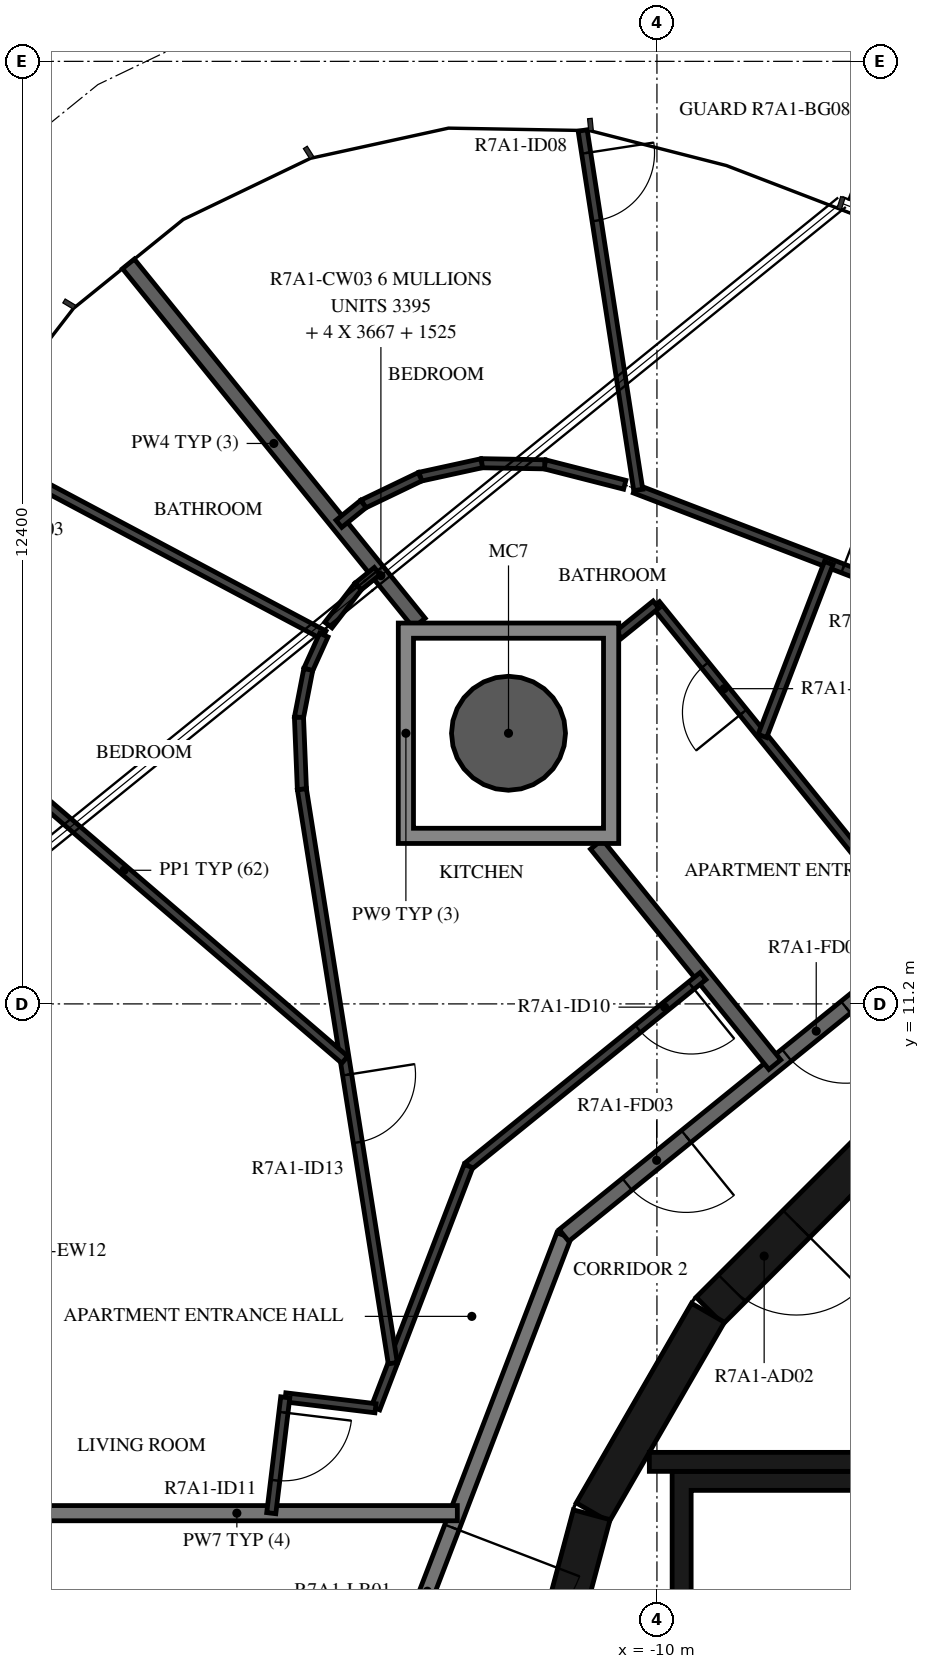
"""IFC4 building model, lengths in metres.
Left out: names, types, materials, properties, quantities, classifications, styles, units other than length and angle.
Written with IfcOpenShell. Run it as: python <this file> out.ifc"""

import sys

from ifc_helpers import new_model, si_unit, direction, frame, frame_2d, origin, origin_2d, place, context, subcontext, project, spatial, polyline, rectangle, hollow_circle, outline, extrude, element, fill, save


model = new_model("IFC4")
c1 = context("Model", 3, precision=1e-05, world=origin(), true_north=direction((0.0, 1.0)))
c2 = subcontext(c1, "Body", "Model", "MODEL_VIEW")
j1 = project(units=[si_unit("LENGTHUNIT", "METRE"), si_unit("PLANEANGLEUNIT", "RADIAN")], contexts=[c1])
p1 = place(None, origin())
s1 = spatial("IfcSite", under=j1, at=p1, CompositionType="ELEMENT")
p2 = place(p1, origin())
s2 = spatial("IfcBuilding", under=s1, at=p2, CompositionType="ELEMENT")
p3 = place(p2, frame((0.0, 0.0, 266.9)))
s3 = spatial("IfcBuildingStorey", under=s2, at=p3, CompositionType="ELEMENT", Elevation=266.9)
p4 = place(p3, frame((-11.953, 14.76, -0.38), z_axis=(0.0, 0.0, 1.0), x_axis=(1.0, 0.0, 0.0)))
e1 = element("IfcColumn", 1, at=p4, inside=s3, PredefinedType="COLUMN", context=c2, shape_type="SweptSolid", body=[
    extrude(hollow_circle(Radius=0.75, WallThickness=0.035, at=origin_2d()), origin(), (0.0, 0.0, 1.0), 3.5),
])
p5 = place(p3, frame((-7.164, 9.308, 0.0), z_axis=(0.0, 0.0, 1.0), x_axis=(-0.707106781187, -0.707106781187, 0.0)))
e2 = element("IfcWall", 2, at=p5, inside=s3, PredefinedType="SHEAR", context=c2, shape_type="SweptSolid", body=[
    extrude(rectangle(XDim=3.032, YDim=0.5, at=frame_2d((1.516, 0.0))), origin(), (0.0, 0.0, 1.0), 3.12),
])
p6 = place(p5, frame((1.416, 0.0, 0.0)))
e3 = element("IfcOpeningElement", 3, at=p6, cuts=e2, PredefinedType="OPENING", context=c2, shape_type="SweptSolid", body=[
    extrude(rectangle(XDim=1.2, YDim=2.1, at=frame_2d((0.6, 1.05))), frame((0.0, 0.26, 0.0), z_axis=(0.0, -1.0, 0.0), x_axis=(1.0, 0.0, 0.0)), (0.0, 0.0, 1.0), 0.52),
])
for number, where, z_axis, x_axis in (
    (4, (-9.329, 7.137, 0.0), (0.0, 0.0, 1.0), (-0.5, -0.866, 0.0)),
    (5, (-10.858, 4.479, 0.0), (0.0, 0.0, 1.0), (-0.259, -0.966, 0.0)),
):
    element("IfcWall", number, at=place(p3, frame(where, z_axis=z_axis, x_axis=x_axis)), inside=s3, PredefinedType="SHEAR", context=c2, shape_type="SweptSolid", body=[
        extrude(rectangle(XDim=3.033, YDim=0.5, at=frame_2d((1.516, 0.0))), origin(), (0.0, 0.0, 1.0), 3.12),
    ])
p7 = place(p3, frame((-7.0, 5.175, 0.0), z_axis=(0.0, 0.0, 1.0), x_axis=(-1.0, 0.0, 0.0)))
e6 = element("IfcWall", 6, at=p7, inside=s3, PredefinedType="SHEAR", context=c2, shape_type="SweptSolid", body=[
    extrude(rectangle(XDim=3.1, YDim=0.25, at=frame_2d((1.55, 0.0))), origin(), (0.0, 0.0, 1.0), 3.12),
])
p8 = place(p3, origin())
e7 = element("IfcWall", 7, at=p8, inside=s3, PredefinedType="SHEAR", context=c2, shape_type="SweptSolid", body=[
    extrude(outline(polyline([(-9.8, 1.9), (-9.55, 1.9), (-9.55, 4.8), (3.1, 4.8), (3.1, 1.9), (3.35, 1.9), (3.35, 4.8), (5.25, 4.8), (5.25, 1.9), (5.5, 1.9), (5.5, 4.8), (7.4, 4.8), (7.4, 1.9), (7.65, 1.9), (7.65, 4.8), (9.55, 4.8), (9.55, 1.9), (9.8, 1.9), (9.8, 4.8), (9.8, 5.05), (-9.8, 5.05), (-9.8, 4.8), (-9.8, 1.9)])), origin(), (0.0, 0.0, 1.0), 3.12),
])
p9 = place(p3, frame((-11.223, 8.154, 0.0), z_axis=(0.0, 0.0, 1.0), x_axis=(-0.358341090983, -0.93359073609, 0.0)))
e8 = element("IfcWall", 8, at=p9, inside=s3, PredefinedType="STANDARD", context=c2, shape_type="SweptSolid", body=[
    extrude(rectangle(XDim=7.181, YDim=0.2, at=frame_2d((3.59, 0.0))), origin(), (0.0, 0.0, 1.0), 3.12),
])
p10 = place(p9, frame((4.114, 0.0, 0.0)))
e9 = element("IfcOpeningElement", 9, at=p10, cuts=e8, PredefinedType="OPENING", context=c2, shape_type="SweptSolid", body=[
    extrude(rectangle(XDim=1.8, YDim=2.1, at=frame_2d((0.9, 1.05))), frame((0.0, 0.11, 0.0), z_axis=(0.0, -1.0, 0.0), x_axis=(1.0, 0.0, 0.0)), (0.0, 0.0, 1.0), 0.22),
])
p11 = place(p3, frame((-5.643, 12.673, 0.0), z_axis=(0.0, 0.0, 1.0), x_axis=(-0.777160148113, -0.629302871585, 0.0)))
e10 = element("IfcWall", 10, at=p11, inside=s3, PredefinedType="STANDARD", context=c2, shape_type="SweptSolid", body=[
    extrude(rectangle(XDim=7.181, YDim=0.2, at=frame_2d((3.59, 0.0))), origin(), (0.0, 0.0, 1.0), 3.12),
])
p12 = place(p11, frame((2.41, 0.0, 0.0)))
e11 = element("IfcOpeningElement", 11, at=p12, cuts=e10, PredefinedType="OPENING", context=c2, shape_type="SweptSolid", body=[
    extrude(rectangle(XDim=1.0, YDim=2.1, at=frame_2d((0.5, 1.05))), frame((0.0, 0.11, 0.0), z_axis=(0.0, -1.0, 0.0), x_axis=(1.0, 0.0, 0.0)), (0.0, 0.0, 1.0), 0.22),
])
p13 = place(p11, frame((5.112, 0.0, 0.0)))
e12 = element("IfcOpeningElement", 12, at=p13, cuts=e10, PredefinedType="OPENING", context=c2, shape_type="SweptSolid", body=[
    extrude(rectangle(XDim=1.0, YDim=2.1, at=frame_2d((0.5, 1.05))), frame((0.0, 0.11, 0.0), z_axis=(0.0, -1.0, 0.0), x_axis=(1.0, 0.0, 0.0)), (0.0, 0.0, 1.0), 0.22),
])
p14 = place(p3, frame((-12.626, 4.5, 0.0), z_axis=(0.0, 0.0, 1.0), x_axis=(-1.0, 0.0, 0.0)))
e13 = element("IfcWall", 13, at=p14, inside=s3, PredefinedType="STANDARD", context=c2, shape_type="SweptSolid", body=[
    extrude(rectangle(XDim=5.802, YDim=0.2, at=frame_2d((2.901, 0.0))), origin(), (0.0, 0.0, 1.0), 3.12),
])
p15 = place(p3, frame((-10.796, 13.299, 0.0), z_axis=(0.0, 0.0, 1.0), x_axis=(0.629290499381, -0.777170166301, 0.0)))
e14 = element("IfcWall", 14, at=p15, inside=s3, PredefinedType="STANDARD", context=c2, shape_type="SweptSolid", body=[
    extrude(rectangle(XDim=3.729, YDim=0.2, at=frame_2d((1.865, 0.0))), origin(), (0.0, 0.0, 1.0), 3.12),
])
p16 = place(p3, frame((-16.953, 20.936, 0.0), z_axis=(0.0, 0.0, 1.0), x_axis=(0.629331057166, -0.777137324085, 0.0)))
e15 = element("IfcWall", 15, at=p16, inside=s3, PredefinedType="STANDARD", context=c2, shape_type="SweptSolid", body=[
    extrude(rectangle(XDim=6.08, YDim=0.2, at=frame_2d((3.04, 0.0))), origin(), (0.0, 0.0, 1.0), 3.12),
])
p17 = place(p3, frame((-7.377, 13.199, 0.0), z_axis=(0.0, 0.0, 1.0), x_axis=(-0.629382670352, 0.77709552454, 0.0)))
e16 = element("IfcWall", 16, at=p17, inside=s3, PredefinedType="PARTITIONING", context=c2, shape_type="SweptSolid", body=[
    extrude(rectangle(XDim=4.188, YDim=0.12, at=frame_2d((2.094, 0.0))), origin(), (0.0, 0.0, 1.0), 3.12),
])
p18 = place(p17, frame((2.364, 0.0, 0.0)))
e17 = element("IfcOpeningElement", 17, at=p18, cuts=e16, PredefinedType="OPENING", context=c2, shape_type="SweptSolid", body=[
    extrude(rectangle(XDim=0.8, YDim=2.1, at=frame_2d((0.4, 1.05))), frame((0.0, 0.07, 0.0), z_axis=(0.0, -1.0, 0.0), x_axis=(1.0, 0.0, 0.0)), (0.0, 0.0, 1.0), 0.14),
])
p19 = place(p3, frame((-10.013, 16.454, 0.0), z_axis=(0.0, 0.0, 1.0), x_axis=(-0.777001388062, -0.629498882406, 0.0)))
e18 = element("IfcWall", 18, at=p19, inside=s3, PredefinedType="PARTITIONING", context=c2, shape_type="SweptSolid", body=[
    extrude(rectangle(XDim=0.631, YDim=0.12, at=frame_2d((0.315, 0.0))), origin(), (0.0, 0.0, 1.0), 3.12),
])
p20 = place(p3, frame((-10.289, 17.978, 0.0), z_axis=(0.0, 0.0, 1.0), x_axis=(0.933579293595, -0.358370900844, 0.0)))
e19 = element("IfcWall", 19, at=p20, inside=s3, PredefinedType="PARTITIONING", context=c2, shape_type="SweptSolid", body=[
    extrude(rectangle(XDim=8.932, YDim=0.12, at=frame_2d((4.466, 0.0))), origin(), (0.0, 0.0, 1.0), 3.12),
])
p21 = place(p20, frame((2.93, 0.0, 0.0)))
e20 = element("IfcOpeningElement", 20, at=p21, cuts=e19, PredefinedType="OPENING", context=c2, shape_type="SweptSolid", body=[
    extrude(rectangle(XDim=0.9, YDim=2.1, at=frame_2d((0.45, 1.05))), frame((0.0, 0.07, 0.0), z_axis=(0.0, -1.0, 0.0), x_axis=(1.0, 0.0, 0.0)), (0.0, 0.0, 1.0), 0.14),
])
p22 = place(p3, frame((-10.977, 22.691, 0.0), z_axis=(0.0, 0.0, 1.0), x_axis=(0.152888983102, -0.988243370252, 0.0)))
e21 = element("IfcWall", 21, at=p22, inside=s3, PredefinedType="PARTITIONING", context=c2, shape_type="SweptSolid", body=[
    extrude(rectangle(XDim=4.786, YDim=0.12, at=frame_2d((2.393, 0.0))), origin(), (0.0, 0.0, 1.0), 3.12),
])
p23 = place(p22, frame((0.3, 0.0, 0.0)))
e22 = element("IfcOpeningElement", 22, at=p23, cuts=e21, PredefinedType="OPENING", context=c2, shape_type="SweptSolid", body=[
    extrude(rectangle(XDim=0.9, YDim=2.1, at=frame_2d((0.45, 1.05))), frame((0.0, 0.07, 0.0), z_axis=(0.0, -1.0, 0.0), x_axis=(1.0, 0.0, 0.0)), (0.0, 0.0, 1.0), 0.14),
])
p24 = place(p3, frame((-7.74, 17.0, 0.0), z_axis=(0.0, 0.0, 1.0), x_axis=(-0.358394723652, -0.93357014844, 0.0)))
e23 = element("IfcWall", 23, at=p24, inside=s3, PredefinedType="PARTITIONING", context=c2, shape_type="SweptSolid", body=[
    extrude(rectangle(XDim=2.436, YDim=0.12, at=frame_2d((1.218, 0.0))), origin(), (0.0, 0.0, 1.0), 3.12),
])
p25 = place(p3, frame((-10.424, 18.03, 0.0), z_axis=(0.0, 0.0, 1.0), x_axis=(-0.968874161395, 0.247553750489, 0.0)))
e24 = element("IfcWall", 24, at=p25, inside=s3, PredefinedType="PARTITIONING", context=c2, shape_type="SweptSolid", body=[
    extrude(rectangle(XDim=1.087, YDim=0.12, at=frame_2d((0.543, 0.0))), origin(), (0.0, 0.0, 1.0), 3.12),
])
p26 = place(p3, frame((-11.477, 18.299, 0.0), z_axis=(0.0, 0.0, 1.0), x_axis=(-0.999848939146, 0.017380992165, 0.0)))
e25 = element("IfcWall", 25, at=p26, inside=s3, PredefinedType="PARTITIONING", context=c2, shape_type="SweptSolid", body=[
    extrude(rectangle(XDim=0.829, YDim=0.12, at=frame_2d((0.415, 0.0))), origin(), (0.0, 0.0, 1.0), 3.12),
])
p27 = place(p3, frame((-12.305, 18.313, 0.0), z_axis=(0.0, 0.0, 1.0), x_axis=(-0.976949932909, -0.21346856581, 0.0)))
e26 = element("IfcWall", 26, at=p27, inside=s3, PredefinedType="PARTITIONING", context=c2, shape_type="SweptSolid", body=[
    extrude(rectangle(XDim=0.829, YDim=0.12, at=frame_2d((0.415, 0.0))), origin(), (0.0, 0.0, 1.0), 3.12),
])
p28 = place(p3, frame((-13.115, 18.136, 0.0), z_axis=(0.0, 0.0, 1.0), x_axis=(-0.901385111422, -0.43301833784, 0.0)))
e27 = element("IfcWall", 27, at=p28, inside=s3, PredefinedType="PARTITIONING", context=c2, shape_type="SweptSolid", body=[
    extrude(rectangle(XDim=0.829, YDim=0.12, at=frame_2d((0.415, 0.0))), origin(), (0.0, 0.0, 1.0), 3.12),
])
p29 = place(p3, frame((-13.862, 17.777, 0.0), z_axis=(0.0, 0.0, 1.0), x_axis=(-0.776888119785, -0.629638665694, 0.0)))
e28 = element("IfcWall", 28, at=p29, inside=s3, PredefinedType="PARTITIONING", context=c2, shape_type="SweptSolid", body=[
    extrude(rectangle(XDim=0.415, YDim=0.12, at=frame_2d((0.207, 0.0))), origin(), (0.0, 0.0, 1.0), 3.12),
])
p30 = place(p3, frame((-9.393, 11.566, 0.0), z_axis=(0.0, 0.0, 1.0), x_axis=(-0.777100258587, -0.629376825205, 0.0)))
e29 = element("IfcWall", 29, at=p30, inside=s3, PredefinedType="PARTITIONING", context=c2, shape_type="SweptSolid", body=[
    extrude(rectangle(XDim=3.971, YDim=0.12, at=frame_2d((1.986, 0.0))), origin(), (0.0, 0.0, 1.0), 3.12),
])
p31 = place(p30, frame((0.2, 0.0, 0.0)))
e30 = element("IfcOpeningElement", 30, at=p31, cuts=e29, PredefinedType="OPENING", context=c2, shape_type="SweptSolid", body=[
    extrude(rectangle(XDim=0.9, YDim=2.1, at=frame_2d((0.45, 1.05))), frame((0.0, 0.07, 0.0), z_axis=(0.0, -1.0, 0.0), x_axis=(1.0, 0.0, 0.0)), (0.0, 0.0, 1.0), 0.14),
])
p32 = place(p3, frame((-12.479, 9.067, 0.0), z_axis=(0.0, 0.0, 1.0), x_axis=(-0.358394302064, -0.933570310286, 0.0)))
e31 = element("IfcWall", 31, at=p32, inside=s3, PredefinedType="PARTITIONING", context=c2, shape_type="SweptSolid", body=[
    extrude(rectangle(XDim=3.414, YDim=0.12, at=frame_2d((1.707, 0.0))), origin(), (0.0, 0.0, 1.0), 3.12),
])
p33 = place(p3, frame((-13.703, 5.88, 0.0), z_axis=(0.0, 0.0, 1.0), x_axis=(-0.992763323859, 0.120087396509, 0.0)))
e32 = element("IfcWall", 32, at=p33, inside=s3, PredefinedType="PARTITIONING", context=c2, shape_type="SweptSolid", body=[
    extrude(rectangle(XDim=1.195, YDim=0.12, at=frame_2d((0.598, 0.0))), origin(), (0.0, 0.0, 1.0), 3.12),
])
p34 = place(p3, frame((-14.89, 6.024, 0.0), z_axis=(0.0, 0.0, 1.0), x_axis=(-0.120255360044, -0.992742992109, 0.0)))
e33 = element("IfcWall", 33, at=p34, inside=s3, PredefinedType="PARTITIONING", context=c2, shape_type="SweptSolid", body=[
    extrude(rectangle(XDim=1.535, YDim=0.12, at=frame_2d((0.768, 0.0))), origin(), (0.0, 0.0, 1.0), 3.12),
])
p35 = place(p34, frame((0.2, 0.0, 0.0)))
e34 = element("IfcOpeningElement", 34, at=p35, cuts=e33, PredefinedType="OPENING", context=c2, shape_type="SweptSolid", body=[
    extrude(rectangle(XDim=0.9, YDim=2.1, at=frame_2d((0.45, 1.05))), frame((0.0, 0.07, 0.0), z_axis=(0.0, -1.0, 0.0), x_axis=(1.0, 0.0, 0.0)), (0.0, 0.0, 1.0), 0.14),
])
p36 = place(p3, frame((-14.323, 16.184, 0.0), z_axis=(0.0, 0.0, 1.0), x_axis=(0.611198506308, 0.791477343887, 0.0)))
e35 = element("IfcWall", 35, at=p36, inside=s3, PredefinedType="PARTITIONING", context=c2, shape_type="SweptSolid", body=[
    extrude(rectangle(XDim=0.642, YDim=0.12, at=frame_2d((0.321, 0.0))), origin(), (0.0, 0.0, 1.0), 3.12),
])
p37 = place(p3, frame((-13.93, 16.692, 0.0), z_axis=(0.0, 0.0, 1.0), x_axis=(0.776695397137, 0.62987638475, 0.0)))
e36 = element("IfcWall", 36, at=p37, inside=s3, PredefinedType="PARTITIONING", context=c2, shape_type="SweptSolid", body=[
    extrude(rectangle(XDim=0.321, YDim=0.12, at=frame_2d((0.161, 0.0))), origin(), (0.0, 0.0, 1.0), 3.12),
])
p38 = place(p3, frame((-18.983, 18.499, 0.0), z_axis=(0.0, 0.0, 1.0), x_axis=(0.882948840489, -0.469469216328, 0.0)))
e37 = element("IfcWall", 37, at=p38, inside=s3, PredefinedType="PARTITIONING", context=c2, shape_type="SweptSolid", body=[
    extrude(rectangle(XDim=5.211, YDim=0.12, at=frame_2d((2.605, 0.0))), origin(), (0.0, 0.0, 1.0), 2.73),
])
p39 = place(p38, frame((0.2, 0.0, 0.0)))
e38 = element("IfcOpeningElement", 38, at=p39, cuts=e37, PredefinedType="OPENING", context=c2, shape_type="SweptSolid", body=[
    extrude(rectangle(XDim=0.8, YDim=2.1, at=frame_2d((0.4, 1.05))), frame((0.0, 0.07, 0.0), z_axis=(0.0, -1.0, 0.0), x_axis=(1.0, 0.0, 0.0)), (0.0, 0.0, 1.0), 0.14),
])
p40 = place(p3, frame((-14.382, 16.052, 0.0), z_axis=(0.0, 0.0, 1.0), x_axis=(-0.412099912529, -0.911138662385, 0.0)))
e39 = element("IfcWall", 39, at=p40, inside=s3, PredefinedType="PARTITIONING", context=c2, shape_type="SweptSolid", body=[
    extrude(rectangle(XDim=0.497, YDim=0.12, at=frame_2d((0.249, 0.0))), origin(), (0.0, 0.0, 1.0), 3.12),
])
p41 = place(p3, frame((-14.587, 15.6, 0.0), z_axis=(0.0, 0.0, 1.0), x_axis=(-0.190920556667, -0.98160549155, 0.0)))
e40 = element("IfcWall", 40, at=p41, inside=s3, PredefinedType="PARTITIONING", context=c2, shape_type="SweptSolid", body=[
    extrude(rectangle(XDim=0.642, YDim=0.12, at=frame_2d((0.321, 0.0))), origin(), (0.0, 0.0, 1.0), 3.12),
])
p42 = place(p3, frame((-14.709, 14.969, 0.0), z_axis=(0.0, 0.0, 1.0), x_axis=(0.040729848009, -0.999170195453, 0.0)))
e41 = element("IfcWall", 41, at=p42, inside=s3, PredefinedType="PARTITIONING", context=c2, shape_type="SweptSolid", body=[
    extrude(rectangle(XDim=0.947, YDim=0.12, at=frame_2d((0.474, 0.0))), origin(), (0.0, 0.0, 1.0), 3.12),
])
p43 = place(p3, frame((-14.671, 14.023, 0.0), z_axis=(0.0, 0.0, 1.0), x_axis=(0.156438190471, -0.987687750538, 0.0)))
e42 = element("IfcWall", 42, at=p43, inside=s3, PredefinedType="PARTITIONING", context=c2, shape_type="SweptSolid", body=[
    extrude(rectangle(XDim=7.644, YDim=0.12, at=frame_2d((3.822, 0.0))), origin(), (0.0, 0.0, 1.0), 3.12),
])
p44 = place(p43, frame((3.803, 0.0, 0.0)))
e43 = element("IfcOpeningElement", 43, at=p44, cuts=e42, PredefinedType="OPENING", context=c2, shape_type="SweptSolid", body=[
    extrude(rectangle(XDim=0.9, YDim=2.1, at=frame_2d((0.45, 1.05))), frame((0.0, 0.07, 0.0), z_axis=(0.0, -1.0, 0.0), x_axis=(1.0, 0.0, 0.0)), (0.0, 0.0, 1.0), 0.14),
])
p45 = place(p3, frame((-19.913, 15.451, 0.0), z_axis=(0.0, 0.0, 1.0), x_axis=(0.758623462992, -0.6515293097, 0.0)))
e44 = element("IfcWall", 44, at=p45, inside=s3, PredefinedType="PARTITIONING", context=c2, shape_type="SweptSolid", body=[
    extrude(rectangle(XDim=7.653, YDim=0.12, at=frame_2d((3.826, 0.0))), origin(), (0.0, 0.0, 1.0), 3.12),
])
p46 = place(p45, frame((0.7, 0.0, 0.0)))
e45 = element("IfcOpeningElement", 45, at=p46, cuts=e44, PredefinedType="OPENING", context=c2, shape_type="SweptSolid", body=[
    extrude(rectangle(XDim=0.9, YDim=2.1, at=frame_2d((0.45, 1.05))), frame((0.0, 0.07, 0.0), z_axis=(0.0, -1.0, 0.0), x_axis=(1.0, 0.0, 0.0)), (0.0, 0.0, 1.0), 0.14),
])
p47 = place(p3, origin())
e46 = element("IfcWall", 46, at=p47, inside=s3, PredefinedType="STANDARD", context=c2, shape_type="SweptSolid", body=[
    extrude(outline(polyline([(-10.503, 16.21), (-10.503, 13.311), (-13.403, 13.311), (-13.403, 16.21), (-10.503, 16.21)]), holes=[polyline([(-13.203, 13.51), (-10.703, 13.51), (-10.703, 16.01), (-13.203, 16.01), (-13.203, 13.51)])]), origin(), (0.0, 0.0, 1.0), 3.12),
])
p48 = place(p6, origin())
e47 = element("IfcDoor", 47, at=p48, inside=s3, OperationType="SINGLE_SWING_RIGHT", PredefinedType="DOOR", context=c2, shape_type="SweptSolid", body=[
    extrude(rectangle(XDim=1.2, YDim=2.1, at=frame_2d((0.6, 1.05))), frame((0.0, 0.025, 0.0), z_axis=(0.0, -1.0, 0.0), x_axis=(1.0, 0.0, 0.0)), (0.0, 0.0, 1.0), 0.05),
])
fill(e3, e47)
p49 = place(p12, origin())
e48 = element("IfcDoor", 48, at=p49, inside=s3, OperationType="SINGLE_SWING_RIGHT", PredefinedType="DOOR", context=c2, shape_type="SweptSolid", body=[
    extrude(rectangle(XDim=1.0, YDim=2.1, at=frame_2d((0.5, 1.05))), frame((0.0, 0.025, 0.0), z_axis=(0.0, -1.0, 0.0), x_axis=(1.0, 0.0, 0.0)), (0.0, 0.0, 1.0), 0.05),
])
fill(e11, e48)
p50 = place(p18, origin())
e49 = element("IfcDoor", 49, at=p50, inside=s3, OperationType="SINGLE_SWING_RIGHT", PredefinedType="DOOR", context=c2, shape_type="SweptSolid", body=[
    extrude(rectangle(XDim=0.8, YDim=2.1, at=frame_2d((0.4, 1.05))), frame((0.0, 0.025, 0.0), z_axis=(0.0, -1.0, 0.0), x_axis=(1.0, 0.0, 0.0)), (0.0, 0.0, 1.0), 0.05),
])
fill(e17, e49)
p51 = place(p23, origin())
e50 = element("IfcDoor", 50, at=p51, inside=s3, OperationType="SINGLE_SWING_RIGHT", PredefinedType="DOOR", context=c2, shape_type="SweptSolid", body=[
    extrude(rectangle(XDim=0.9, YDim=2.1, at=frame_2d((0.45, 1.05))), frame((0.0, 0.025, 0.0), z_axis=(0.0, -1.0, 0.0), x_axis=(1.0, 0.0, 0.0)), (0.0, 0.0, 1.0), 0.05),
])
fill(e22, e50)
p52 = place(p21, origin())
e51 = element("IfcDoor", 51, at=p52, inside=s3, OperationType="SINGLE_SWING_LEFT", PredefinedType="DOOR", context=c2, shape_type="SweptSolid", body=[
    extrude(rectangle(XDim=0.9, YDim=2.1, at=frame_2d((0.45, 1.05))), frame((0.0, 0.025, 0.0), z_axis=(0.0, -1.0, 0.0), x_axis=(1.0, 0.0, 0.0)), (0.0, 0.0, 1.0), 0.05),
])
fill(e20, e51)
p53 = place(p13, origin())
e52 = element("IfcDoor", 52, at=p53, inside=s3, OperationType="SINGLE_SWING_LEFT", PredefinedType="DOOR", context=c2, shape_type="SweptSolid", body=[
    extrude(rectangle(XDim=1.0, YDim=2.1, at=frame_2d((0.5, 1.05))), frame((0.0, 0.025, 0.0), z_axis=(0.0, -1.0, 0.0), x_axis=(1.0, 0.0, 0.0)), (0.0, 0.0, 1.0), 0.05),
])
fill(e12, e52)
p54 = place(p31, origin())
e53 = element("IfcDoor", 53, at=p54, inside=s3, OperationType="SINGLE_SWING_LEFT", PredefinedType="DOOR", context=c2, shape_type="SweptSolid", body=[
    extrude(rectangle(XDim=0.9, YDim=2.1, at=frame_2d((0.45, 1.05))), frame((0.0, 0.025, 0.0), z_axis=(0.0, -1.0, 0.0), x_axis=(1.0, 0.0, 0.0)), (0.0, 0.0, 1.0), 0.05),
])
fill(e30, e53)
p55 = place(p35, origin())
e54 = element("IfcDoor", 54, at=p55, inside=s3, OperationType="SINGLE_SWING_LEFT", PredefinedType="DOOR", context=c2, shape_type="SweptSolid", body=[
    extrude(rectangle(XDim=0.9, YDim=2.1, at=frame_2d((0.45, 1.05))), frame((0.0, 0.025, 0.0), z_axis=(0.0, -1.0, 0.0), x_axis=(1.0, 0.0, 0.0)), (0.0, 0.0, 1.0), 0.05),
])
fill(e34, e54)
p56 = place(p44, origin())
e55 = element("IfcDoor", 55, at=p56, inside=s3, OperationType="SINGLE_SWING_RIGHT", PredefinedType="DOOR", context=c2, shape_type="SweptSolid", body=[
    extrude(rectangle(XDim=0.9, YDim=2.1, at=frame_2d((0.45, 1.05))), frame((0.0, 0.025, 0.0), z_axis=(0.0, -1.0, 0.0), x_axis=(1.0, 0.0, 0.0)), (0.0, 0.0, 1.0), 0.05),
])
fill(e43, e55)
p57 = place(p10, origin())
e56 = element("IfcDoor", 56, at=p57, inside=s3, OperationType="DOUBLE_DOOR_SINGLE_SWING", PredefinedType="DOOR", context=c2, shape_type="SweptSolid", body=[
    extrude(rectangle(XDim=1.8, YDim=2.1, at=frame_2d((0.9, 1.05))), frame((0.0, 0.025, 0.0), z_axis=(0.0, -1.0, 0.0), x_axis=(1.0, 0.0, 0.0)), (0.0, 0.0, 1.0), 0.05),
])
fill(e9, e56)
save(model, sys.argv[1])
